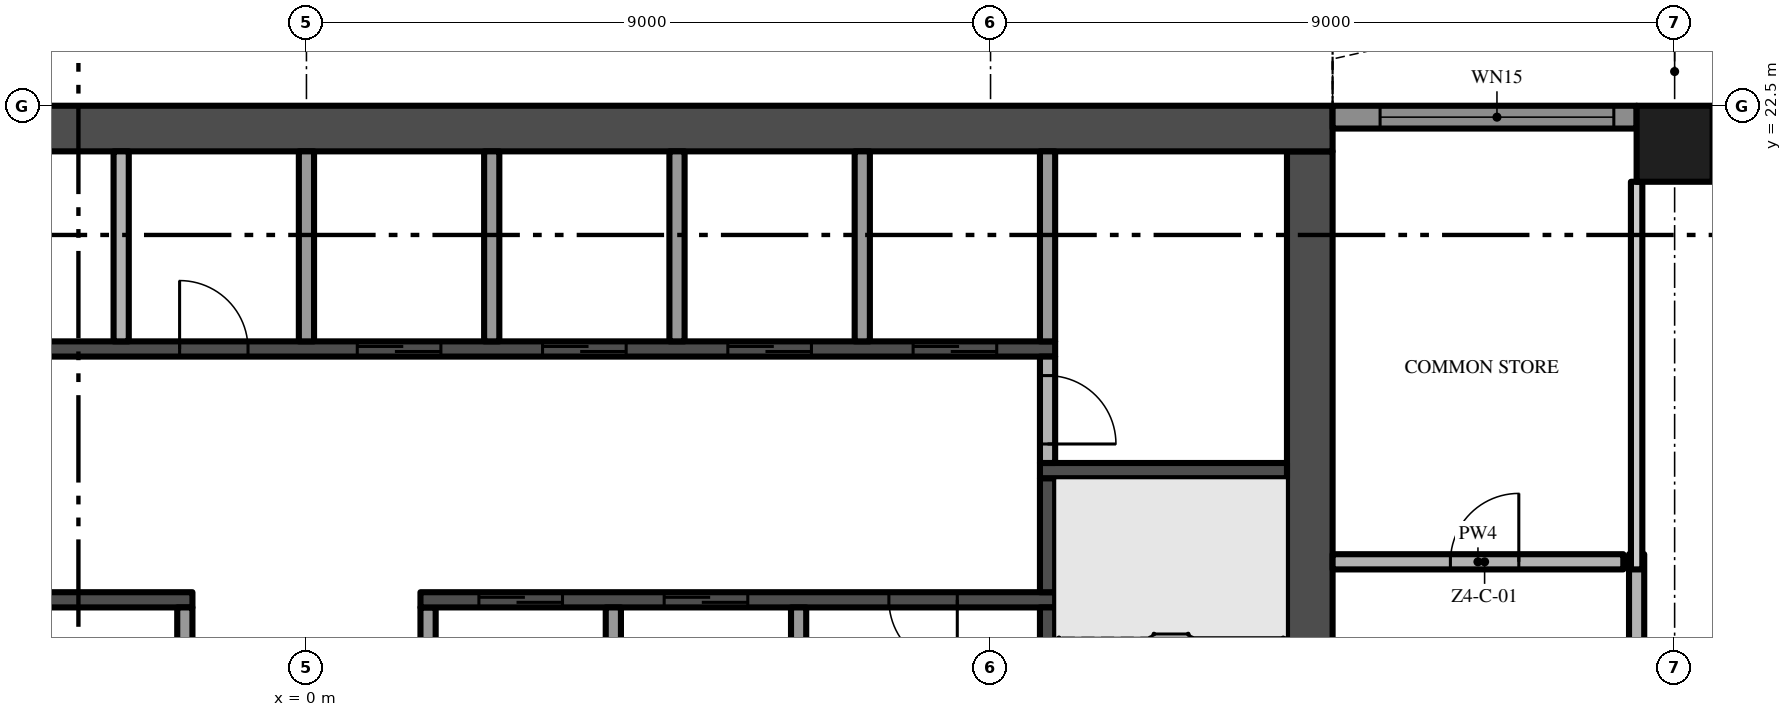
"""IFC4 building model, lengths in metres.
Left out: names, types, materials, properties, quantities, classifications, styles, units other than length and angle.
Written with IfcOpenShell. Run it as: python <this file> out.ifc"""

import sys

from ifc_helpers import new_model, si_unit, direction, frame, frame_2d, origin, origin_2d, place, context, subcontext, project, spatial, polyline, rectangle, outline, extrude, element, fill, save


model = new_model("IFC4")
c1 = context("Model", 3, precision=1e-05, world=origin(), true_north=direction((0.0, 1.0)))
c2 = subcontext(c1, "Body", "Model", "MODEL_VIEW")
j1 = project(units=[si_unit("LENGTHUNIT", "METRE"), si_unit("PLANEANGLEUNIT", "RADIAN")], contexts=[c1])
p1 = place(None, origin())
s1 = spatial("IfcSite", under=j1, at=p1, CompositionType="ELEMENT")
p2 = place(p1, origin())
s2 = spatial("IfcBuilding", under=s1, at=p2, CompositionType="ELEMENT")
p3 = place(p2, frame((0.0, 0.0, 214.8)))
s3 = spatial("IfcBuildingStorey", under=s2, at=p3, CompositionType="ELEMENT", Elevation=214.8)
p4 = place(p3, frame((13.2, 5.1, -0.3), z_axis=(0.0, 0.0, 1.0), x_axis=(0.0, 1.0, 0.0)))
e1 = element("IfcWall", 1, at=p4, inside=s3, PredefinedType="SHEAR", context=c2, shape_type="SweptSolid", body=[
    extrude(rectangle(XDim=16.8, YDim=0.6, at=frame_2d((8.4, 0.0))), origin(), (0.0, 0.0, 1.0), 3.8),
])
p5 = place(p4, frame((6.3, 0.0, 0.3)))
e2 = element("IfcOpeningElement", 2, at=p5, cuts=e1, PredefinedType="OPENING", context=c2, shape_type="SweptSolid", body=[
    extrude(rectangle(XDim=1.2, YDim=2.2, at=frame_2d((0.6, 1.1))), frame((0.0, 0.31, 0.0), z_axis=(0.0, -1.0, 0.0), x_axis=(1.0, 0.0, 0.0)), (0.0, 0.0, 1.0), 0.62),
])
p6 = place(p3, frame((13.5, 22.2, -0.3), z_axis=(0.0, 0.0, 1.0), x_axis=(-1.0, 0.0, 0.0)))
e3 = element("IfcWall", 3, at=p6, inside=s3, PredefinedType="SHEAR", context=c2, shape_type="SweptSolid", body=[
    extrude(rectangle(XDim=27.0, YDim=0.6, at=frame_2d((13.5, 0.0))), origin(), (0.0, 0.0, 1.0), 3.8),
])
p7 = place(p3, frame((18.0, 22.0, 0.0), z_axis=(0.0, 0.0, 1.0), x_axis=(1.0, 0.0, 0.0)))
e4 = element("IfcColumn", 4, at=p7, inside=s3, PredefinedType="COLUMN", context=c2, shape_type="SweptSolid", body=[
    extrude(rectangle(XDim=1.0, YDim=1.0, at=origin_2d()), origin(), (0.0, 0.0, 1.0), 3.5),
])
p8 = place(p3, frame((13.5, 22.35, 0.0), z_axis=(0.0, 0.0, 1.0), x_axis=(1.0, 0.0, 0.0)))
e5 = element("IfcWall", 5, at=p8, inside=s3, PredefinedType="SOLIDWALL", context=c2, shape_type="SweptSolid", body=[
    extrude(rectangle(XDim=4.0, YDim=0.3, at=frame_2d((2.0, 0.0))), origin(), (0.0, 0.0, 1.0), 3.5),
])
p9 = place(p8, frame((0.625, 0.0, 0.45)))
e6 = element("IfcOpeningElement", 6, at=p9, cuts=e5, PredefinedType="OPENING", context=c2, shape_type="SweptSolid", body=[
    extrude(rectangle(XDim=3.075, YDim=2.65, at=frame_2d((1.538, 1.325))), frame((0.0, 0.16, 0.0), z_axis=(0.0, -1.0, 0.0), x_axis=(1.0, 0.0, 0.0)), (0.0, 0.0, 1.0), 0.32),
])
p10 = place(p3, origin())
e7 = element("IfcWall", 7, at=p10, inside=s3, PredefinedType="USERDEFINED", context=c2, shape_type="SweptSolid", body=[
    extrude(outline(polyline([(22.5, 25.149), (21.0, 25.485), (20.625, 25.5), (19.5, 25.369), (18.0, 24.845), (16.5, 24.112), (15.0, 23.451), (13.5, 23.115), (13.555, 22.871), (15.079, 23.213), (16.605, 23.885), (18.096, 24.614), (19.556, 25.124), (20.635, 25.249), (20.967, 25.236), (22.445, 24.905), (22.5, 25.149)])), origin(), (0.0, 0.0, 1.0), 0.9),
])
p11 = place(p3, frame((-1.5, 16.0, 0.0), z_axis=(0.0, 0.0, 1.0), x_axis=(-1.0, 0.0, 0.0)))
e8 = element("IfcWall", 8, at=p11, inside=s3, PredefinedType="SHEAR", context=c2, shape_type="SweptSolid", body=[
    extrude(rectangle(XDim=8.35, YDim=0.2, at=frame_2d((4.175, 0.0))), origin(), (0.0, 0.0, 1.0), 3.5),
])
p12 = place(p11, frame((6.162, 0.0, 0.0)))
e9 = element("IfcOpeningElement", 9, at=p12, cuts=e8, PredefinedType="OPENING", context=c2, shape_type="SweptSolid", body=[
    extrude(rectangle(XDim=0.9, YDim=2.1, at=frame_2d((0.45, 1.05))), frame((0.0, 0.11, 0.0), z_axis=(0.0, -1.0, 0.0), x_axis=(1.0, 0.0, 0.0)), (0.0, 0.0, 1.0), 0.22),
])
p13 = place(p3, frame((-9.85, 19.3, 0.0), z_axis=(0.0, 0.0, 1.0), x_axis=(1.0, 0.0, 0.0)))
e10 = element("IfcWall", 10, at=p13, inside=s3, PredefinedType="SHEAR", context=c2, shape_type="SweptSolid", body=[
    extrude(rectangle(XDim=19.7, YDim=0.2, at=frame_2d((9.85, 0.0))), origin(), (0.0, 0.0, 1.0), 3.5),
])
p14 = place(p13, frame((10.519, 0.0, 0.0)))
e11 = element("IfcOpeningElement", 11, at=p14, cuts=e10, PredefinedType="OPENING", context=c2, shape_type="SweptSolid", body=[
    extrude(rectangle(XDim=1.1, YDim=2.1, at=frame_2d((0.55, 1.05))), frame((0.0, 0.11, 0.0), z_axis=(0.0, -1.0, 0.0), x_axis=(1.0, 0.0, 0.0)), (0.0, 0.0, 1.0), 0.22),
])
p15 = place(p13, frame((12.956, 0.0, 0.0)))
e12 = element("IfcOpeningElement", 12, at=p15, cuts=e10, PredefinedType="OPENING", context=c2, shape_type="SweptSolid", body=[
    extrude(rectangle(XDim=1.1, YDim=2.1, at=frame_2d((0.55, 1.05))), frame((0.0, 0.11, 0.0), z_axis=(0.0, -1.0, 0.0), x_axis=(1.0, 0.0, 0.0)), (0.0, 0.0, 1.0), 0.22),
])
p16 = place(p13, frame((15.394, 0.0, 0.0)))
e13 = element("IfcOpeningElement", 13, at=p16, cuts=e10, PredefinedType="OPENING", context=c2, shape_type="SweptSolid", body=[
    extrude(rectangle(XDim=1.1, YDim=2.1, at=frame_2d((0.55, 1.05))), frame((0.0, 0.11, 0.0), z_axis=(0.0, -1.0, 0.0), x_axis=(1.0, 0.0, 0.0)), (0.0, 0.0, 1.0), 0.22),
])
p17 = place(p13, frame((17.831, 0.0, 0.0)))
e14 = element("IfcOpeningElement", 14, at=p17, cuts=e10, PredefinedType="OPENING", context=c2, shape_type="SweptSolid", body=[
    extrude(rectangle(XDim=1.1, YDim=2.1, at=frame_2d((0.55, 1.05))), frame((0.0, 0.11, 0.0), z_axis=(0.0, -1.0, 0.0), x_axis=(1.0, 0.0, 0.0)), (0.0, 0.0, 1.0), 0.22),
])
p18 = place(p13, frame((3.306, 0.0, 0.0)))
e15 = element("IfcOpeningElement", 15, at=p18, cuts=e10, PredefinedType="OPENING", context=c2, shape_type="SweptSolid", body=[
    extrude(rectangle(XDim=0.9, YDim=2.1, at=frame_2d((0.45, 1.05))), frame((0.0, 0.11, 0.0), z_axis=(0.0, -1.0, 0.0), x_axis=(1.0, 0.0, 0.0)), (0.0, 0.0, 1.0), 0.22),
])
p19 = place(p13, frame((8.181, 0.0, 0.0)))
e16 = element("IfcOpeningElement", 16, at=p19, cuts=e10, PredefinedType="OPENING", context=c2, shape_type="SweptSolid", body=[
    extrude(rectangle(XDim=0.9, YDim=2.1, at=frame_2d((0.45, 1.05))), frame((0.0, 0.11, 0.0), z_axis=(0.0, -1.0, 0.0), x_axis=(1.0, 0.0, 0.0)), (0.0, 0.0, 1.0), 0.22),
])
p20 = place(p3, frame((-2.438, 19.4, 0.0), z_axis=(0.0, 0.0, 1.0), x_axis=(0.0, 1.0, 0.0)))
e17 = element("IfcWall", 17, at=p20, inside=s3, PredefinedType="PARTITIONING", context=c2, shape_type="SweptSolid", body=[
    extrude(rectangle(XDim=2.5, YDim=0.2, at=frame_2d((1.25, 0.0))), origin(), (0.0, 0.0, 1.0), 3.5),
])
p21 = place(p3, frame((-1.6, 13.7, 0.0), z_axis=(0.0, 0.0, 1.0), x_axis=(0.0, 1.0, 0.0)))
e18 = element("IfcWall", 18, at=p21, inside=s3, PredefinedType="PARTITIONING", context=c2, shape_type="SweptSolid", body=[
    extrude(rectangle(XDim=2.2, YDim=0.2, at=frame_2d((1.1, 0.0))), origin(), (0.0, 0.0, 1.0), 3.5),
])
p22 = place(p3, frame((0.0, 19.4, 0.0), z_axis=(0.0, 0.0, 1.0), x_axis=(0.0, 1.0, 0.0)))
e19 = element("IfcWall", 19, at=p22, inside=s3, PredefinedType="PARTITIONING", context=c2, shape_type="SweptSolid", body=[
    extrude(rectangle(XDim=2.5, YDim=0.2, at=frame_2d((1.25, 0.0))), origin(), (0.0, 0.0, 1.0), 3.5),
])
p23 = place(p3, frame((1.6, 13.7, 0.0), z_axis=(0.0, 0.0, 1.0), x_axis=(0.0, 1.0, 0.0)))
e20 = element("IfcWall", 20, at=p23, inside=s3, PredefinedType="PARTITIONING", context=c2, shape_type="SweptSolid", body=[
    extrude(rectangle(XDim=2.2, YDim=0.2, at=frame_2d((1.1, 0.0))), origin(), (0.0, 0.0, 1.0), 3.5),
])
p24 = place(p3, frame((9.85, 16.0, 0.0), z_axis=(0.0, 0.0, 1.0), x_axis=(-1.0, 0.0, 0.0)))
e21 = element("IfcWall", 21, at=p24, inside=s3, PredefinedType="SHEAR", context=c2, shape_type="SweptSolid", body=[
    extrude(rectangle(XDim=8.35, YDim=0.2, at=frame_2d((4.175, 0.0))), origin(), (0.0, 0.0, 1.0), 3.5),
])
p25 = place(p24, frame((6.481, 0.0, 0.0)))
e22 = element("IfcOpeningElement", 22, at=p25, cuts=e21, PredefinedType="OPENING", context=c2, shape_type="SweptSolid", body=[
    extrude(rectangle(XDim=1.1, YDim=2.1, at=frame_2d((0.55, 1.05))), frame((0.0, 0.11, 0.0), z_axis=(0.0, -1.0, 0.0), x_axis=(1.0, 0.0, 0.0)), (0.0, 0.0, 1.0), 0.22),
])
p26 = place(p24, frame((4.044, 0.0, 0.0)))
e23 = element("IfcOpeningElement", 23, at=p26, cuts=e21, PredefinedType="OPENING", context=c2, shape_type="SweptSolid", body=[
    extrude(rectangle(XDim=1.1, YDim=2.1, at=frame_2d((0.55, 1.05))), frame((0.0, 0.11, 0.0), z_axis=(0.0, -1.0, 0.0), x_axis=(1.0, 0.0, 0.0)), (0.0, 0.0, 1.0), 0.22),
])
p27 = place(p24, frame((1.288, 0.0, 0.0)))
e24 = element("IfcOpeningElement", 24, at=p27, cuts=e21, PredefinedType="OPENING", context=c2, shape_type="SweptSolid", body=[
    extrude(rectangle(XDim=0.9, YDim=2.1, at=frame_2d((0.45, 1.05))), frame((0.0, 0.11, 0.0), z_axis=(0.0, -1.0, 0.0), x_axis=(1.0, 0.0, 0.0)), (0.0, 0.0, 1.0), 0.22),
])
p28 = place(p3, frame((2.438, 19.4, 0.0), z_axis=(0.0, 0.0, 1.0), x_axis=(0.0, 1.0, 0.0)))
e25 = element("IfcWall", 25, at=p28, inside=s3, PredefinedType="PARTITIONING", context=c2, shape_type="SweptSolid", body=[
    extrude(rectangle(XDim=2.5, YDim=0.2, at=frame_2d((1.25, 0.0))), origin(), (0.0, 0.0, 1.0), 3.5),
])
p29 = place(p3, frame((4.037, 13.7, 0.0), z_axis=(0.0, 0.0, 1.0), x_axis=(0.0, 1.0, 0.0)))
e26 = element("IfcWall", 26, at=p29, inside=s3, PredefinedType="PARTITIONING", context=c2, shape_type="SweptSolid", body=[
    extrude(rectangle(XDim=2.2, YDim=0.2, at=frame_2d((1.1, 0.0))), origin(), (0.0, 0.0, 1.0), 3.5),
])
p30 = place(p3, frame((4.875, 19.4, 0.0), z_axis=(0.0, 0.0, 1.0), x_axis=(0.0, 1.0, 0.0)))
e27 = element("IfcWall", 27, at=p30, inside=s3, PredefinedType="PARTITIONING", context=c2, shape_type="SweptSolid", body=[
    extrude(rectangle(XDim=2.5, YDim=0.2, at=frame_2d((1.25, 0.0))), origin(), (0.0, 0.0, 1.0), 3.5),
])
p31 = place(p3, frame((6.475, 13.7, 0.0), z_axis=(0.0, 0.0, 1.0), x_axis=(0.0, 1.0, 0.0)))
e28 = element("IfcWall", 28, at=p31, inside=s3, PredefinedType="PARTITIONING", context=c2, shape_type="SweptSolid", body=[
    extrude(rectangle(XDim=2.2, YDim=0.2, at=frame_2d((1.1, 0.0))), origin(), (0.0, 0.0, 1.0), 3.5),
])
p32 = place(p3, frame((7.312, 19.4, 0.0), z_axis=(0.0, 0.0, 1.0), x_axis=(0.0, 1.0, 0.0)))
e29 = element("IfcWall", 29, at=p32, inside=s3, PredefinedType="PARTITIONING", context=c2, shape_type="SweptSolid", body=[
    extrude(rectangle(XDim=2.5, YDim=0.2, at=frame_2d((1.25, 0.0))), origin(), (0.0, 0.0, 1.0), 3.5),
])
p33 = place(p3, frame((9.75, 12.3, 0.0), z_axis=(0.0, 0.0, 1.0), x_axis=(0.0, 1.0, 0.0)))
e30 = element("IfcWall", 30, at=p33, inside=s3, PredefinedType="SHEAR", context=c2, shape_type="SweptSolid", body=[
    extrude(rectangle(XDim=3.6, YDim=0.2, at=frame_2d((1.8, 0.0))), origin(), (0.0, 0.0, 1.0), 3.5),
])
p34 = place(p3, frame((9.75, 16.1, 0.0), z_axis=(0.0, 0.0, 1.0), x_axis=(0.0, 1.0, 0.0)))
e31 = element("IfcWall", 31, at=p34, inside=s3, PredefinedType="SHEAR", context=c2, shape_type="SweptSolid", body=[
    extrude(rectangle(XDim=1.5, YDim=0.2, at=frame_2d((0.75, 0.0))), origin(), (0.0, 0.0, 1.0), 3.5),
])
p35 = place(p3, frame((9.65, 17.7, 0.0), z_axis=(0.0, 0.0, 1.0), x_axis=(1.0, 0.0, 0.0)))
e32 = element("IfcWall", 32, at=p35, inside=s3, PredefinedType="SHEAR", context=c2, shape_type="SweptSolid", body=[
    extrude(rectangle(XDim=3.25, YDim=0.2, at=frame_2d((1.625, 0.0))), origin(), (0.0, 0.0, 1.0), 3.5),
])
p36 = place(p3, frame((9.75, 19.2, 0.0), z_axis=(0.0, 0.0, 1.0), x_axis=(0.0, -1.0, 0.0)))
e33 = element("IfcWall", 33, at=p36, inside=s3, PredefinedType="PARTITIONING", context=c2, shape_type="SweptSolid", body=[
    extrude(rectangle(XDim=1.4, YDim=0.2, at=frame_2d((0.7, 0.0))), origin(), (0.0, 0.0, 1.0), 3.5),
])
p37 = place(p36, frame((0.25, 0.0, 0.0)))
e34 = element("IfcOpeningElement", 34, at=p37, cuts=e33, PredefinedType="OPENING", context=c2, shape_type="SweptSolid", body=[
    extrude(rectangle(XDim=0.9, YDim=2.1, at=frame_2d((0.45, 1.05))), frame((0.0, 0.11, 0.0), z_axis=(0.0, -1.0, 0.0), x_axis=(1.0, 0.0, 0.0)), (0.0, 0.0, 1.0), 0.22),
])
p38 = place(p3, frame((9.75, 19.4, 0.0), z_axis=(0.0, 0.0, 1.0), x_axis=(0.0, 1.0, 0.0)))
e35 = element("IfcWall", 35, at=p38, inside=s3, PredefinedType="PARTITIONING", context=c2, shape_type="SweptSolid", body=[
    extrude(rectangle(XDim=2.5, YDim=0.2, at=frame_2d((1.25, 0.0))), origin(), (0.0, 0.0, 1.0), 3.5),
])
p39 = place(p3, frame((13.5, 16.5, 0.0), z_axis=(0.0, 0.0, 1.0), x_axis=(1.0, 0.0, 0.0)))
e36 = element("IfcWall", 36, at=p39, inside=s3, PredefinedType="PARTITIONING", context=c2, shape_type="SweptSolid", body=[
    extrude(rectangle(XDim=3.825, YDim=0.2, at=frame_2d((1.913, 0.0))), origin(), (0.0, 0.0, 1.0), 3.5),
])
p40 = place(p39, frame((1.55, 0.0, 0.0)))
e37 = element("IfcOpeningElement", 37, at=p40, cuts=e36, PredefinedType="OPENING", context=c2, shape_type="SweptSolid", body=[
    extrude(rectangle(XDim=0.9, YDim=2.1, at=frame_2d((0.45, 1.05))), frame((0.0, 0.11, 0.0), z_axis=(0.0, -1.0, 0.0), x_axis=(1.0, 0.0, 0.0)), (0.0, 0.0, 1.0), 0.22),
])
p41 = place(p3, frame((17.5, 16.6, 0.0), z_axis=(0.0, 0.0, 1.0), x_axis=(0.0, -1.0, 0.0)))
e38 = element("IfcWall", 38, at=p41, inside=s3, PredefinedType="PARTITIONING", context=c2, shape_type="SweptSolid", body=[
    extrude(rectangle(XDim=2.55, YDim=0.2, at=frame_2d((1.275, 0.0))), origin(), (0.0, 0.0, 1.0), 3.5),
])
p42 = place(p41, frame((1.2, 0.0, 0.0)))
e39 = element("IfcOpeningElement", 39, at=p42, cuts=e38, PredefinedType="OPENING", context=c2, shape_type="SweptSolid", body=[
    extrude(rectangle(XDim=1.2, YDim=2.4, at=frame_2d((0.6, 1.2))), frame((0.0, 0.11, 0.0), z_axis=(0.0, -1.0, 0.0), x_axis=(1.0, 0.0, 0.0)), (0.0, 0.0, 1.0), 0.22),
])
p43 = place(p3, frame((17.5, 16.4, 0.0), z_axis=(0.0, 0.0, 1.0), x_axis=(0.0, 1.0, 0.0)))
e40 = element("IfcWall", 40, at=p43, inside=s3, PredefinedType="PARTITIONING", context=c2, shape_type="SweptSolid", body=[
    extrude(rectangle(XDim=5.1, YDim=0.15, at=frame_2d((2.55, 0.0))), origin(), (0.0, 0.0, 1.0), 3.5),
])
p44 = place(p9, origin())
e41 = element("IfcWindow", 41, at=p44, inside=s3, PartitioningType="SINGLE_PANEL", PredefinedType="WINDOW", context=c2, shape_type="SweptSolid", body=[
    extrude(rectangle(XDim=3.075, YDim=2.65, at=frame_2d((1.538, 1.325))), frame((0.0, 0.03, 0.0), z_axis=(0.0, -1.0, 0.0), x_axis=(1.0, 0.0, 0.0)), (0.0, 0.0, 1.0), 0.06),
])
fill(e6, e41)
p45 = place(p14, origin())
e42 = element("IfcDoor", 42, at=p45, inside=s3, OperationType="SLIDING_TO_RIGHT", PredefinedType="DOOR", context=c2, shape_type="SweptSolid", body=[
    extrude(rectangle(XDim=1.1, YDim=2.1, at=frame_2d((0.55, 1.05))), frame((0.0, 0.025, 0.0), z_axis=(0.0, -1.0, 0.0), x_axis=(1.0, 0.0, 0.0)), (0.0, 0.0, 1.0), 0.05),
])
fill(e11, e42)
p46 = place(p15, origin())
e43 = element("IfcDoor", 43, at=p46, inside=s3, OperationType="SLIDING_TO_RIGHT", PredefinedType="DOOR", context=c2, shape_type="SweptSolid", body=[
    extrude(rectangle(XDim=1.1, YDim=2.1, at=frame_2d((0.55, 1.05))), frame((0.0, 0.025, 0.0), z_axis=(0.0, -1.0, 0.0), x_axis=(1.0, 0.0, 0.0)), (0.0, 0.0, 1.0), 0.05),
])
fill(e12, e43)
p47 = place(p16, origin())
e44 = element("IfcDoor", 44, at=p47, inside=s3, OperationType="SLIDING_TO_RIGHT", PredefinedType="DOOR", context=c2, shape_type="SweptSolid", body=[
    extrude(rectangle(XDim=1.1, YDim=2.1, at=frame_2d((0.55, 1.05))), frame((0.0, 0.025, 0.0), z_axis=(0.0, -1.0, 0.0), x_axis=(1.0, 0.0, 0.0)), (0.0, 0.0, 1.0), 0.05),
])
fill(e13, e44)
p48 = place(p17, origin())
e45 = element("IfcDoor", 45, at=p48, inside=s3, OperationType="SLIDING_TO_RIGHT", PredefinedType="DOOR", context=c2, shape_type="SweptSolid", body=[
    extrude(rectangle(XDim=1.1, YDim=2.1, at=frame_2d((0.55, 1.05))), frame((0.0, 0.025, 0.0), z_axis=(0.0, -1.0, 0.0), x_axis=(1.0, 0.0, 0.0)), (0.0, 0.0, 1.0), 0.05),
])
fill(e14, e45)
p49 = place(p25, origin())
e46 = element("IfcDoor", 46, at=p49, inside=s3, OperationType="SLIDING_TO_RIGHT", PredefinedType="DOOR", context=c2, shape_type="SweptSolid", body=[
    extrude(rectangle(XDim=1.1, YDim=2.1, at=frame_2d((0.55, 1.05))), frame((0.0, 0.025, 0.0), z_axis=(0.0, -1.0, 0.0), x_axis=(1.0, 0.0, 0.0)), (0.0, 0.0, 1.0), 0.05),
])
fill(e22, e46)
p50 = place(p26, origin())
e47 = element("IfcDoor", 47, at=p50, inside=s3, OperationType="SLIDING_TO_RIGHT", PredefinedType="DOOR", context=c2, shape_type="SweptSolid", body=[
    extrude(rectangle(XDim=1.1, YDim=2.1, at=frame_2d((0.55, 1.05))), frame((0.0, 0.025, 0.0), z_axis=(0.0, -1.0, 0.0), x_axis=(1.0, 0.0, 0.0)), (0.0, 0.0, 1.0), 0.05),
])
fill(e23, e47)
p51 = place(p27, origin())
e48 = element("IfcDoor", 48, at=p51, inside=s3, OperationType="SINGLE_SWING_LEFT", PredefinedType="DOOR", context=c2, shape_type="SweptSolid", body=[
    extrude(rectangle(XDim=0.9, YDim=2.1, at=frame_2d((0.45, 1.05))), frame((0.0, 0.025, 0.0), z_axis=(0.0, -1.0, 0.0), x_axis=(1.0, 0.0, 0.0)), (0.0, 0.0, 1.0), 0.05),
])
fill(e24, e48)
p52 = place(p37, origin())
e49 = element("IfcDoor", 49, at=p52, inside=s3, OperationType="SINGLE_SWING_RIGHT", PredefinedType="DOOR", context=c2, shape_type="SweptSolid", body=[
    extrude(rectangle(XDim=0.9, YDim=2.1, at=frame_2d((0.45, 1.05))), frame((0.0, 0.025, 0.0), z_axis=(0.0, -1.0, 0.0), x_axis=(1.0, 0.0, 0.0)), (0.0, 0.0, 1.0), 0.05),
])
fill(e34, e49)
p53 = place(p19, origin())
e50 = element("IfcDoor", 50, at=p53, inside=s3, OperationType="SINGLE_SWING_LEFT", PredefinedType="DOOR", context=c2, shape_type="SweptSolid", body=[
    extrude(rectangle(XDim=0.9, YDim=2.1, at=frame_2d((0.45, 1.05))), frame((0.0, 0.025, 0.0), z_axis=(0.0, -1.0, 0.0), x_axis=(1.0, 0.0, 0.0)), (0.0, 0.0, 1.0), 0.05),
])
fill(e16, e50)
p54 = place(p40, origin())
e51 = element("IfcDoor", 51, at=p54, inside=s3, OperationType="SINGLE_SWING_RIGHT", PredefinedType="DOOR", context=c2, shape_type="SweptSolid", body=[
    extrude(rectangle(XDim=0.9, YDim=2.1, at=frame_2d((0.45, 1.05))), frame((0.0, 0.025, 0.0), z_axis=(0.0, -1.0, 0.0), x_axis=(1.0, 0.0, 0.0)), (0.0, 0.0, 1.0), 0.05),
])
fill(e37, e51)
save(model, sys.argv[1])
